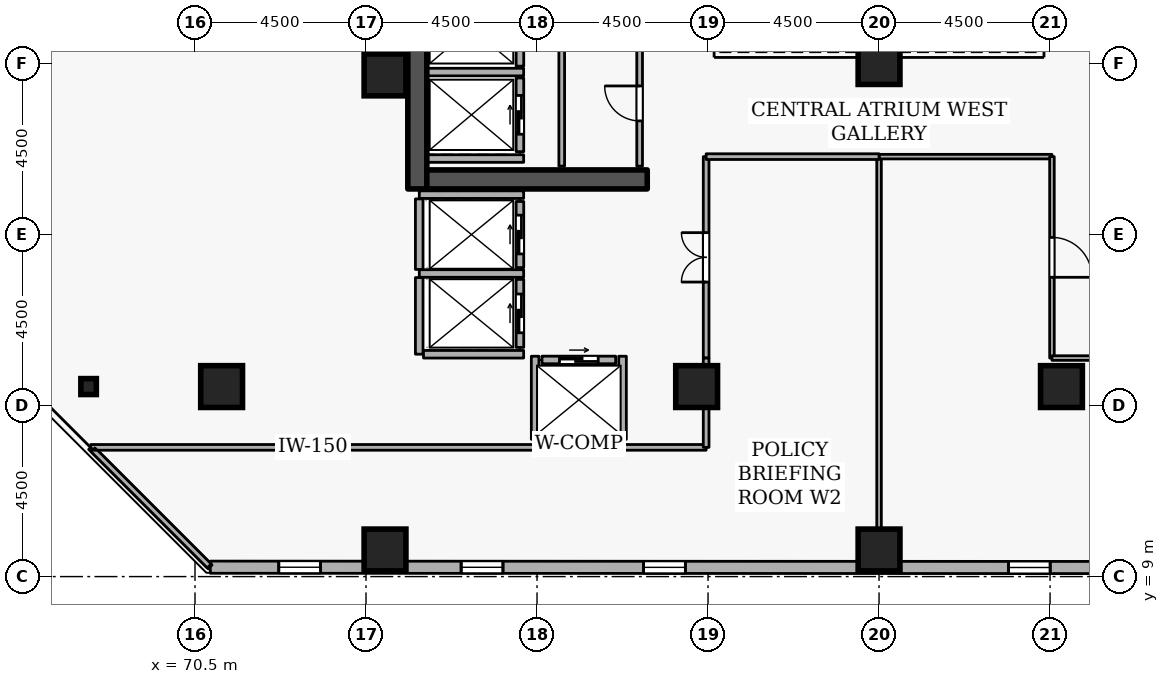
"""IFC4 building model, lengths in metres.
Left out: names, types, materials, properties, quantities, classifications, styles, units other than length and angle.
Written with IfcOpenShell. Run it as: python <this file> out.ifc"""

import sys

from ifc_helpers import new_model, si_unit, direction, frame, frame_2d, origin, origin_2d, place, context, subcontext, project, spatial, rectangle, i_section, extrude, element, fill, save


model = new_model("IFC4")
c1 = context("Model", 3, precision=1e-05, world=origin(), true_north=direction((0.0, 1.0)))
c2 = subcontext(c1, "Body", "Model", "MODEL_VIEW")
j1 = project(units=[si_unit("LENGTHUNIT", "METRE"), si_unit("PLANEANGLEUNIT", "RADIAN")], contexts=[c1])
p1 = place(None, origin())
s1 = spatial("IfcSite", under=j1, at=p1, CompositionType="ELEMENT")
p2 = place(p1, origin())
s2 = spatial("IfcBuilding", under=s1, at=p2, CompositionType="ELEMENT")
p3 = place(p2, frame((0.0, 0.0, 174.3)))
s3 = spatial("IfcBuildingStorey", under=s2, at=p3, CompositionType="ELEMENT", Elevation=174.3)
p4 = place(p3, frame((76.35, 19.2, 0.0), z_axis=(0.0, 0.0, 1.0), x_axis=(0.0, 1.0, 0.0)))
e1 = element("IfcWall", 1, at=p4, inside=s3, PredefinedType="SHEAR", context=c2, shape_type="SweptSolid", body=[
    extrude(rectangle(XDim=15.6, YDim=0.5, at=frame_2d((7.8, 0.0))), origin(), (0.0, 0.0, 1.0), 4.2),
])
p5 = place(p3, frame((76.6, 19.45, 0.0), z_axis=(0.0, 0.0, 1.0), x_axis=(1.0, 0.0, 0.0)))
e2 = element("IfcWall", 2, at=p5, inside=s3, PredefinedType="SHEAR", context=c2, shape_type="SweptSolid", body=[
    extrude(rectangle(XDim=5.8, YDim=0.5, at=frame_2d((2.9, 0.0))), origin(), (0.0, 0.0, 1.0), 4.2),
])
for number, where, z_axis, x_axis in (
    (3, (71.2, 14.0, 0.0), (0.0, 0.0, 1.0), (1.0, 0.0, 0.0)),
    (4, (88.5, 9.7, 0.0), (0.0, 0.0, 1.0), (1.0, 0.0, 0.0)),
    (5, (75.5, 9.7, 0.0), (0.0, 0.0, 1.0), (1.0, 0.0, 0.0)),
    (6, (93.3, 14.0, 0.0), (0.0, 0.0, 1.0), (1.0, 0.0, 0.0)),
    (7, (83.7, 14.0, 0.0), (0.0, 0.0, 1.0), (1.0, 0.0, 0.0)),
    (8, (75.5, 22.2, 0.0), (0.0, 0.0, 1.0), (1.0, 0.0, 0.0)),
    (9, (88.5, 22.5, 0.0), (0.0, 0.0, 1.0), (1.0, 0.0, 0.0)),
):
    element("IfcColumn", number, at=place(p3, frame(where, z_axis=z_axis, x_axis=x_axis)), inside=s3, PredefinedType="COLUMN", context=c2, shape_type="SweptSolid", body=[
        extrude(rectangle(XDim=1.1, YDim=1.1, at=origin_2d()), origin(), (0.0, 0.0, 1.0), 4.2),
    ])
p6 = place(p3, frame((67.7, 14.0, 0.0), z_axis=(0.0, 0.0, 1.0), x_axis=(1.0, 0.0, 0.0)))
e10 = element("IfcColumn", 10, at=p6, inside=s3, PredefinedType="COLUMN", context=c2, shape_type="SweptSolid", body=[
    extrude(i_section(OverallWidth=0.407, OverallDepth=0.419, WebThickness=0.031, FlangeThickness=0.049, FilletRadius=0.015, at=origin_2d()), origin(), (0.0, 0.0, 1.0), 4.2),
])
p7 = place(p3, frame((70.904, 9.247, 0.0), z_axis=(0.0, 0.0, 1.0), x_axis=(0.999999933399, -0.000364968916, 0.0)))
e11 = element("IfcWall", 11, at=p7, inside=s3, PredefinedType="STANDARD", context=c2, shape_type="SweptSolid", body=[
    extrude(rectangle(XDim=32.778, YDim=0.32, at=frame_2d((16.389, 0.0))), origin(), (0.0, 0.0, 1.0), 3.3),
])
p8 = place(p7, frame((1.8, 0.0, 0.72)))
e12 = element("IfcOpeningElement", 12, at=p8, cuts=e11, PredefinedType="OPENING", context=c2, shape_type="SweptSolid", body=[
    extrude(rectangle(XDim=1.1, YDim=1.8, at=frame_2d((0.55, 0.9))), frame((0.0, 0.17, 0.0), z_axis=(0.0, -1.0, 0.0), x_axis=(1.0, 0.0, 0.0)), (0.0, 0.0, 1.0), 0.34),
])
p9 = place(p7, frame((6.6, 0.0, 0.72)))
e13 = element("IfcOpeningElement", 13, at=p9, cuts=e11, PredefinedType="OPENING", context=c2, shape_type="SweptSolid", body=[
    extrude(rectangle(XDim=1.1, YDim=1.8, at=frame_2d((0.55, 0.9))), frame((0.0, 0.17, 0.0), z_axis=(0.0, -1.0, 0.0), x_axis=(1.0, 0.0, 0.0)), (0.0, 0.0, 1.0), 0.34),
])
p10 = place(p7, frame((11.4, 0.0, 0.72)))
e14 = element("IfcOpeningElement", 14, at=p10, cuts=e11, PredefinedType="OPENING", context=c2, shape_type="SweptSolid", body=[
    extrude(rectangle(XDim=1.1, YDim=1.8, at=frame_2d((0.55, 0.9))), frame((0.0, 0.17, 0.0), z_axis=(0.0, -1.0, 0.0), x_axis=(1.0, 0.0, 0.0)), (0.0, 0.0, 1.0), 0.34),
])
p11 = place(p7, frame((21.0, 0.0, 0.72)))
e15 = element("IfcOpeningElement", 15, at=p11, cuts=e11, PredefinedType="OPENING", context=c2, shape_type="SweptSolid", body=[
    extrude(rectangle(XDim=1.1, YDim=1.8, at=frame_2d((0.55, 0.9))), frame((0.0, 0.17, 0.0), z_axis=(0.0, -1.0, 0.0), x_axis=(1.0, 0.0, 0.0)), (0.0, 0.0, 1.0), 0.34),
])
p12 = place(p7, frame((25.8, 0.0, 0.72)))
e16 = element("IfcOpeningElement", 16, at=p12, cuts=e11, PredefinedType="OPENING", context=c2, shape_type="SweptSolid", body=[
    extrude(rectangle(XDim=1.1, YDim=1.8, at=frame_2d((0.55, 0.9))), frame((0.0, 0.17, 0.0), z_axis=(0.0, -1.0, 0.0), x_axis=(1.0, 0.0, 0.0)), (0.0, 0.0, 1.0), 0.34),
])
p13 = place(p3, frame((79.05, 22.43, 0.0), z_axis=(0.0, 0.0, 1.0), x_axis=(0.0, 1.0, 0.0)))
e17 = element("IfcWall", 17, at=p13, inside=s3, PredefinedType="STANDARD", context=c2, shape_type="SweptSolid", body=[
    extrude(rectangle(XDim=1.99, YDim=0.2, at=frame_2d((0.995, 0.0))), origin(), (0.0, 0.0, 1.0), 3.94),
])
p14 = place(p13, frame((0.485, 0.0, 0.0)))
e18 = element("IfcOpeningElement", 18, at=p14, cuts=e17, PredefinedType="OPENING", context=c2, shape_type="SweptSolid", body=[
    extrude(rectangle(XDim=1.02, YDim=2.06, at=frame_2d((0.51, 1.03))), frame((0.0, 0.11, 0.0), z_axis=(0.0, -1.0, 0.0), x_axis=(1.0, 0.0, 0.0)), (0.0, 0.0, 1.0), 0.22),
])
p15 = place(p3, frame((79.05, 20.18, 0.0), z_axis=(0.0, 0.0, 1.0), x_axis=(0.0, 1.0, 0.0)))
e19 = element("IfcWall", 19, at=p15, inside=s3, PredefinedType="STANDARD", context=c2, shape_type="SweptSolid", body=[
    extrude(rectangle(XDim=1.94, YDim=0.2, at=frame_2d((0.97, 0.0))), origin(), (0.0, 0.0, 1.0), 3.94),
])
p16 = place(p15, frame((0.46, 0.0, 0.0)))
e20 = element("IfcOpeningElement", 20, at=p16, cuts=e19, PredefinedType="OPENING", context=c2, shape_type="SweptSolid", body=[
    extrude(rectangle(XDim=1.02, YDim=2.06, at=frame_2d((0.51, 1.03))), frame((0.0, 0.11, 0.0), z_axis=(0.0, -1.0, 0.0), x_axis=(1.0, 0.0, 0.0)), (0.0, 0.0, 1.0), 0.22),
])
p17 = place(p3, frame((79.05, 17.13, 0.0), z_axis=(0.0, 0.0, 1.0), x_axis=(0.0, 1.0, 0.0)))
e21 = element("IfcWall", 21, at=p17, inside=s3, PredefinedType="STANDARD", context=c2, shape_type="SweptSolid", body=[
    extrude(rectangle(XDim=1.74, YDim=0.2, at=frame_2d((0.87, 0.0))), origin(), (0.0, 0.0, 1.0), 3.94),
])
p18 = place(p17, frame((0.36, 0.0, 0.0)))
e22 = element("IfcOpeningElement", 22, at=p18, cuts=e21, PredefinedType="OPENING", context=c2, shape_type="SweptSolid", body=[
    extrude(rectangle(XDim=1.02, YDim=2.06, at=frame_2d((0.51, 1.03))), frame((0.0, 0.11, 0.0), z_axis=(0.0, -1.0, 0.0), x_axis=(1.0, 0.0, 0.0)), (0.0, 0.0, 1.0), 0.22),
])
p19 = place(p3, frame((79.05, 15.03, 0.0), z_axis=(0.0, 0.0, 1.0), x_axis=(0.0, 1.0, 0.0)))
e23 = element("IfcWall", 23, at=p19, inside=s3, PredefinedType="STANDARD", context=c2, shape_type="SweptSolid", body=[
    extrude(rectangle(XDim=1.79, YDim=0.2, at=frame_2d((0.895, 0.0))), origin(), (0.0, 0.0, 1.0), 3.94),
])
p20 = place(p19, frame((0.385, 0.0, 0.0)))
e24 = element("IfcOpeningElement", 24, at=p20, cuts=e23, PredefinedType="OPENING", context=c2, shape_type="SweptSolid", body=[
    extrude(rectangle(XDim=1.02, YDim=2.06, at=frame_2d((0.51, 1.03))), frame((0.0, 0.11, 0.0), z_axis=(0.0, -1.0, 0.0), x_axis=(1.0, 0.0, 0.0)), (0.0, 0.0, 1.0), 0.22),
])
p21 = place(p3, frame((79.63, 14.7, 0.0), z_axis=(0.0, 0.0, 1.0), x_axis=(1.0, 0.0, 0.0)))
e25 = element("IfcWall", 25, at=p21, inside=s3, PredefinedType="STANDARD", context=c2, shape_type="SweptSolid", body=[
    extrude(rectangle(XDim=1.94, YDim=0.2, at=frame_2d((0.97, 0.0))), origin(), (0.0, 0.0, 1.0), 3.94),
])
p22 = place(p21, frame((0.46, 0.0, 0.0)))
e26 = element("IfcOpeningElement", 26, at=p22, cuts=e25, PredefinedType="OPENING", context=c2, shape_type="SweptSolid", body=[
    extrude(rectangle(XDim=1.02, YDim=2.06, at=frame_2d((0.51, 1.03))), frame((0.0, 0.11, 0.0), z_axis=(0.0, -1.0, 0.0), x_axis=(1.0, 0.0, 0.0)), (0.0, 0.0, 1.0), 0.22),
])
for number, where, z_axis, x_axis in (
    (27, (76.612, 22.275, 0.0), (0.0, 0.0, 1.0), (1.0, 0.0, 0.0)),
    (28, (76.612, 20.0, 0.0), (0.0, 0.0, 1.0), (1.0, 0.0, 0.0)),
):
    element("IfcWall", number, at=place(p3, frame(where, z_axis=z_axis, x_axis=x_axis)), inside=s3, PredefinedType="STANDARD", context=c2, shape_type="SweptSolid", body=[
        extrude(rectangle(XDim=2.536, YDim=0.2, at=frame_2d((1.268, 0.0))), origin(), (0.0, 0.0, 1.0), 3.94),
    ])
p23 = place(p3, frame((76.402, 19.05, 0.0), z_axis=(0.0, 0.0, 1.0), x_axis=(1.0, 0.0, 0.0)))
e29 = element("IfcWall", 29, at=p23, inside=s3, PredefinedType="STANDARD", context=c2, shape_type="SweptSolid", body=[
    extrude(rectangle(XDim=2.746, YDim=0.2, at=frame_2d((1.373, 0.0))), origin(), (0.0, 0.0, 1.0), 3.145),
])
p24 = place(p3, frame((76.402, 16.975, 0.0), z_axis=(0.0, 0.0, 1.0), x_axis=(1.0, 0.0, 0.0)))
e30 = element("IfcWall", 30, at=p24, inside=s3, PredefinedType="STANDARD", context=c2, shape_type="SweptSolid", body=[
    extrude(rectangle(XDim=2.746, YDim=0.2, at=frame_2d((1.373, 0.0))), origin(), (0.0, 0.0, 1.0), 3.94),
])
p25 = place(p3, frame((76.4, 14.852, 0.0), z_axis=(0.0, 0.0, 1.0), x_axis=(0.0, 1.0, 0.0)))
e31 = element("IfcWall", 31, at=p25, inside=s3, PredefinedType="STANDARD", context=c2, shape_type="SweptSolid", body=[
    extrude(rectangle(XDim=2.016, YDim=0.2, at=frame_2d((1.008, 0.0))), origin(), (0.0, 0.0, 1.0), 3.94),
])
p26 = place(p3, frame((76.4, 17.082, 0.0), z_axis=(0.0, 0.0, 1.0), x_axis=(0.0, 1.0, 0.0)))
e32 = element("IfcWall", 32, at=p26, inside=s3, PredefinedType="STANDARD", context=c2, shape_type="SweptSolid", body=[
    extrude(rectangle(XDim=1.856, YDim=0.2, at=frame_2d((0.928, 0.0))), origin(), (0.0, 0.0, 1.0), 3.94),
])
p27 = place(p3, frame((76.512, 14.85, 0.0), z_axis=(0.0, 0.0, 1.0), x_axis=(1.0, 0.0, 0.0)))
e33 = element("IfcWall", 33, at=p27, inside=s3, PredefinedType="STANDARD", context=c2, shape_type="SweptSolid", body=[
    extrude(rectangle(XDim=2.636, YDim=0.2, at=frame_2d((1.318, 0.0))), origin(), (0.0, 0.0, 1.0), 3.94),
])
p28 = place(p3, frame((79.452, 12.5, 0.0), z_axis=(0.0, 0.0, 1.0), x_axis=(1.0, 0.0, 0.0)))
e34 = element("IfcWall", 34, at=p28, inside=s3, PredefinedType="STANDARD", context=c2, shape_type="SweptSolid", body=[
    extrude(rectangle(XDim=2.296, YDim=0.2, at=frame_2d((1.148, 0.0))), origin(), (0.0, 0.0, 1.0), 3.94),
])
for number, where, z_axis, x_axis in (
    (35, (81.75, 12.612, 0.0), (0.0, 0.0, 1.0), (0.0, 1.0, 0.0)),
    (36, (79.45, 12.612, 0.0), (0.0, 0.0, 1.0), (0.0, 1.0, 0.0)),
):
    element("IfcWall", number, at=place(p3, frame(where, z_axis=z_axis, x_axis=x_axis)), inside=s3, PredefinedType="STANDARD", context=c2, shape_type="SweptSolid", body=[
        extrude(rectangle(XDim=2.186, YDim=0.2, at=frame_2d((1.093, 0.0))), origin(), (0.0, 0.0, 1.0), 3.94),
    ])
p29 = place(p3, frame((82.2, 19.8, 0.0), z_axis=(0.0, 0.0, 1.0), x_axis=(0.0, 1.0, 0.0)))
e37 = element("IfcWall", 37, at=p29, inside=s3, PredefinedType="PARTITIONING", context=c2, shape_type="SweptSolid", body=[
    extrude(rectangle(XDim=3.3, YDim=0.15, at=frame_2d((1.65, 0.0))), origin(), (0.0, 0.0, 1.0), 3.94),
])
p30 = place(p29, frame((1.19, 0.0, 0.0)))
e38 = element("IfcOpeningElement", 38, at=p30, cuts=e37, PredefinedType="OPENING", context=c2, shape_type="SweptSolid", body=[
    extrude(rectangle(XDim=0.92, YDim=2.08, at=frame_2d((0.46, 1.04))), frame((0.0, 0.085, 0.0), z_axis=(0.0, -1.0, 0.0), x_axis=(1.0, 0.0, 0.0)), (0.0, 0.0, 1.0), 0.17),
])
p31 = place(p3, frame((80.15, 23.1, 0.0), z_axis=(0.0, 0.0, 1.0), x_axis=(0.0, -1.0, 0.0)))
e39 = element("IfcWall", 39, at=p31, inside=s3, PredefinedType="PARTITIONING", context=c2, shape_type="SweptSolid", body=[
    extrude(rectangle(XDim=3.3, YDim=0.15, at=frame_2d((1.65, 0.0))), origin(), (0.0, 0.0, 1.0), 3.94),
])
p32 = place(p3, frame((88.5, 9.28, 0.0), z_axis=(0.0, 0.0, 1.0), x_axis=(0.0, 1.0, 0.0)))
e40 = element("IfcWall", 40, at=p32, inside=s3, PredefinedType="PARTITIONING", context=c2, shape_type="SweptSolid", body=[
    extrude(rectangle(XDim=10.77, YDim=0.12, at=frame_2d((5.385, 0.0))), origin(), (0.0, 0.0, 1.0), 3.532),
])
p33 = place(p3, frame((88.5, 20.05, 0.0), z_axis=(0.0, 0.0, 1.0), x_axis=(1.0, 0.0, 0.0)))
e41 = element("IfcWall", 41, at=p33, inside=s3, PredefinedType="PARTITIONING", context=c2, shape_type="SweptSolid", body=[
    extrude(rectangle(XDim=4.55, YDim=0.12, at=frame_2d((2.275, 0.0))), origin(), (0.0, 0.0, 1.0), 3.94),
])
p34 = place(p3, frame((93.05, 20.05, 0.0), z_axis=(0.0, 0.0, 1.0), x_axis=(0.0, -1.0, 0.0)))
e42 = element("IfcWall", 42, at=p34, inside=s3, PredefinedType="PARTITIONING", context=c2, shape_type="SweptSolid", body=[
    extrude(rectangle(XDim=5.3, YDim=0.12, at=frame_2d((2.65, 0.0))), origin(), (0.0, 0.0, 1.0), 3.94),
])
p35 = place(p34, frame((2.125, 0.0, 0.0)))
e43 = element("IfcOpeningElement", 43, at=p35, cuts=e42, PredefinedType="OPENING", context=c2, shape_type="SweptSolid", body=[
    extrude(rectangle(XDim=1.05, YDim=2.1, at=frame_2d((0.525, 1.05))), frame((0.0, 0.07, 0.0), z_axis=(0.0, -1.0, 0.0), x_axis=(1.0, 0.0, 0.0)), (0.0, 0.0, 1.0), 0.14),
])
p36 = place(p3, frame((93.05, 14.75, 0.0), z_axis=(0.0, 0.0, 1.0), x_axis=(1.0, 0.0, 0.0)))
e44 = element("IfcWall", 44, at=p36, inside=s3, PredefinedType="PARTITIONING", context=c2, shape_type="SweptSolid", body=[
    extrude(rectangle(XDim=1.75, YDim=0.12, at=frame_2d((0.875, 0.0))), origin(), (0.0, 0.0, 1.0), 3.94),
])
p37 = place(p3, frame((83.95, 14.75, 0.0), z_axis=(0.0, 0.0, 1.0), x_axis=(0.0, 1.0, 0.0)))
e45 = element("IfcWall", 45, at=p37, inside=s3, PredefinedType="PARTITIONING", context=c2, shape_type="SweptSolid", body=[
    extrude(rectangle(XDim=5.3, YDim=0.15, at=frame_2d((2.65, 0.0))), origin(), (0.0, 0.0, 1.0), 3.94),
])
p38 = place(p37, frame((2.0, 0.0, 0.0)))
e46 = element("IfcOpeningElement", 46, at=p38, cuts=e45, PredefinedType="OPENING", context=c2, shape_type="SweptSolid", body=[
    extrude(rectangle(XDim=1.3, YDim=2.12, at=frame_2d((0.65, 1.06))), frame((0.0, 0.085, 0.0), z_axis=(0.0, -1.0, 0.0), x_axis=(1.0, 0.0, 0.0)), (0.0, 0.0, 1.0), 0.17),
])
p39 = place(p3, frame((83.95, 20.05, 0.0), z_axis=(0.0, 0.0, 1.0), x_axis=(1.0, 0.0, 0.0)))
e47 = element("IfcWall", 47, at=p39, inside=s3, PredefinedType="PARTITIONING", context=c2, shape_type="SweptSolid", body=[
    extrude(rectangle(XDim=4.55, YDim=0.15, at=frame_2d((2.275, 0.0))), origin(), (0.0, 0.0, 1.0), 3.94),
])
p40 = place(p3, frame((70.875, 9.28, 0.0), z_axis=(0.0, 0.0, 1.0), x_axis=(-0.707106781187, 0.707106781187, 0.0)))
e48 = element("IfcWall", 48, at=p40, inside=s3, PredefinedType="PARTITIONING", context=c2, shape_type="SweptSolid", body=[
    extrude(rectangle(XDim=4.412, YDim=0.15, at=frame_2d((2.206, 0.0))), origin(), (0.0, 0.0, 1.0), 3.94),
])
p41 = place(p3, frame((67.755, 12.4, 0.0), z_axis=(0.0, 0.0, 1.0), x_axis=(1.0, 0.0, 0.0)))
e49 = element("IfcWall", 49, at=p41, inside=s3, PredefinedType="PARTITIONING", context=c2, shape_type="SweptSolid", body=[
    extrude(rectangle(XDim=11.697, YDim=0.15, at=frame_2d((5.849, 0.0))), origin(), (0.0, 0.0, 1.0), 3.94),
])
p42 = place(p3, frame((81.748, 12.4, 0.0), z_axis=(0.0, 0.0, 1.0), x_axis=(1.0, 0.0, 0.0)))
e50 = element("IfcWall", 50, at=p42, inside=s3, PredefinedType="PARTITIONING", context=c2, shape_type="SweptSolid", body=[
    extrude(rectangle(XDim=2.202, YDim=0.15, at=frame_2d((1.101, 0.0))), origin(), (0.0, 0.0, 1.0), 3.94),
])
p43 = place(p3, frame((83.95, 12.4, 0.0), z_axis=(0.0, 0.0, 1.0), x_axis=(0.0, 1.0, 0.0)))
e51 = element("IfcWall", 51, at=p43, inside=s3, PredefinedType="PARTITIONING", context=c2, shape_type="SweptSolid", body=[
    extrude(rectangle(XDim=2.35, YDim=0.15, at=frame_2d((1.175, 0.0))), origin(), (0.0, 0.0, 1.0), 3.94),
])
p44 = place(p8, origin())
e52 = element("IfcWindow", 52, at=p44, inside=s3, PartitioningType="SINGLE_PANEL", PredefinedType="WINDOW", context=c2, shape_type="SweptSolid", body=[
    extrude(rectangle(XDim=1.1, YDim=1.8, at=frame_2d((0.55, 0.9))), frame((0.0, 0.03, 0.0), z_axis=(0.0, -1.0, 0.0), x_axis=(1.0, 0.0, 0.0)), (0.0, 0.0, 1.0), 0.06),
])
fill(e12, e52)
p45 = place(p9, origin())
e53 = element("IfcWindow", 53, at=p45, inside=s3, PartitioningType="SINGLE_PANEL", PredefinedType="WINDOW", context=c2, shape_type="SweptSolid", body=[
    extrude(rectangle(XDim=1.1, YDim=1.8, at=frame_2d((0.55, 0.9))), frame((0.0, 0.03, 0.0), z_axis=(0.0, -1.0, 0.0), x_axis=(1.0, 0.0, 0.0)), (0.0, 0.0, 1.0), 0.06),
])
fill(e13, e53)
p46 = place(p10, origin())
e54 = element("IfcWindow", 54, at=p46, inside=s3, PartitioningType="SINGLE_PANEL", PredefinedType="WINDOW", context=c2, shape_type="SweptSolid", body=[
    extrude(rectangle(XDim=1.1, YDim=1.8, at=frame_2d((0.55, 0.9))), frame((0.0, 0.03, 0.0), z_axis=(0.0, -1.0, 0.0), x_axis=(1.0, 0.0, 0.0)), (0.0, 0.0, 1.0), 0.06),
])
fill(e14, e54)
p47 = place(p11, origin())
e55 = element("IfcWindow", 55, at=p47, inside=s3, PartitioningType="SINGLE_PANEL", PredefinedType="WINDOW", context=c2, shape_type="SweptSolid", body=[
    extrude(rectangle(XDim=1.1, YDim=1.8, at=frame_2d((0.55, 0.9))), frame((0.0, 0.03, 0.0), z_axis=(0.0, -1.0, 0.0), x_axis=(1.0, 0.0, 0.0)), (0.0, 0.0, 1.0), 0.06),
])
fill(e15, e55)
p48 = place(p16, origin())
e56 = element("IfcDoor", 56, at=p48, inside=s3, OperationType="SLIDING_TO_LEFT", PredefinedType="DOOR", context=c2, shape_type="SweptSolid", body=[
    extrude(rectangle(XDim=1.02, YDim=2.06, at=frame_2d((0.51, 1.03))), frame((0.0, 0.025, 0.0), z_axis=(0.0, -1.0, 0.0), x_axis=(1.0, 0.0, 0.0)), (0.0, 0.0, 1.0), 0.05),
])
fill(e20, e56)
p49 = place(p18, origin())
e57 = element("IfcDoor", 57, at=p49, inside=s3, OperationType="SLIDING_TO_LEFT", PredefinedType="DOOR", context=c2, shape_type="SweptSolid", body=[
    extrude(rectangle(XDim=1.02, YDim=2.06, at=frame_2d((0.51, 1.03))), frame((0.0, 0.025, 0.0), z_axis=(0.0, -1.0, 0.0), x_axis=(1.0, 0.0, 0.0)), (0.0, 0.0, 1.0), 0.05),
])
fill(e22, e57)
p50 = place(p20, origin())
e58 = element("IfcDoor", 58, at=p50, inside=s3, OperationType="SLIDING_TO_LEFT", PredefinedType="DOOR", context=c2, shape_type="SweptSolid", body=[
    extrude(rectangle(XDim=1.02, YDim=2.06, at=frame_2d((0.51, 1.03))), frame((0.0, 0.025, 0.0), z_axis=(0.0, -1.0, 0.0), x_axis=(1.0, 0.0, 0.0)), (0.0, 0.0, 1.0), 0.05),
])
fill(e24, e58)
p51 = place(p22, origin())
e59 = element("IfcDoor", 59, at=p51, inside=s3, OperationType="SLIDING_TO_LEFT", PredefinedType="DOOR", context=c2, shape_type="SweptSolid", body=[
    extrude(rectangle(XDim=1.02, YDim=2.06, at=frame_2d((0.51, 1.03))), frame((0.0, 0.025, 0.0), z_axis=(0.0, -1.0, 0.0), x_axis=(1.0, 0.0, 0.0)), (0.0, 0.0, 1.0), 0.05),
])
fill(e26, e59)
p52 = place(p30, origin())
e60 = element("IfcDoor", 60, at=p52, inside=s3, OperationType="SINGLE_SWING_RIGHT", PredefinedType="DOOR", context=c2, shape_type="SweptSolid", body=[
    extrude(rectangle(XDim=0.92, YDim=2.08, at=frame_2d((0.46, 1.04))), frame((0.0, 0.025, 0.0), z_axis=(0.0, -1.0, 0.0), x_axis=(1.0, 0.0, 0.0)), (0.0, 0.0, 1.0), 0.05),
])
fill(e38, e60)
p53 = place(p35, origin())
e61 = element("IfcDoor", 61, at=p53, inside=s3, OperationType="SINGLE_SWING_RIGHT", PredefinedType="DOOR", context=c2, shape_type="SweptSolid", body=[
    extrude(rectangle(XDim=1.05, YDim=2.1, at=frame_2d((0.525, 1.05))), frame((0.0, 0.025, 0.0), z_axis=(0.0, -1.0, 0.0), x_axis=(1.0, 0.0, 0.0)), (0.0, 0.0, 1.0), 0.05),
])
fill(e43, e61)
p54 = place(p38, origin())
e62 = element("IfcDoor", 62, at=p54, inside=s3, OperationType="DOUBLE_DOOR_SINGLE_SWING", PredefinedType="DOOR", context=c2, shape_type="SweptSolid", body=[
    extrude(rectangle(XDim=1.3, YDim=2.12, at=frame_2d((0.65, 1.06))), frame((0.0, 0.025, 0.0), z_axis=(0.0, -1.0, 0.0), x_axis=(1.0, 0.0, 0.0)), (0.0, 0.0, 1.0), 0.05),
])
fill(e46, e62)
save(model, sys.argv[1])
